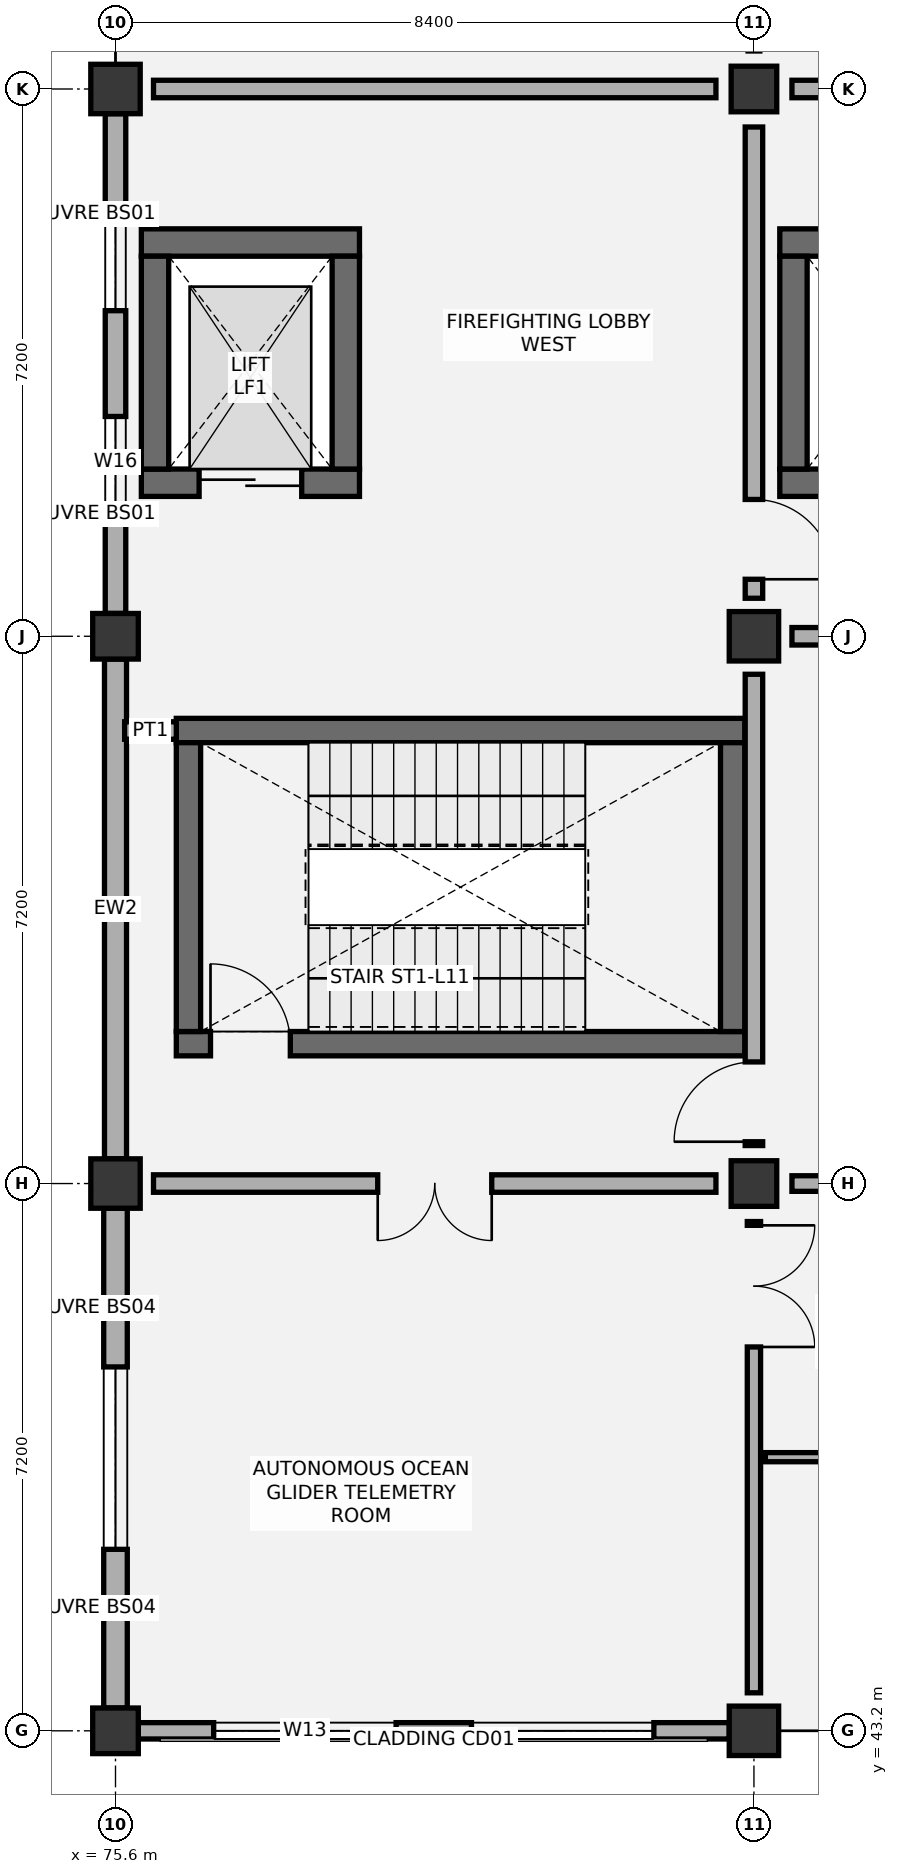
"""IFC4 building model, lengths in metres.
Left out: names, types, materials, properties, quantities, classifications, styles, units other than length and angle.
Written with IfcOpenShell. Run it as: python <this file> out.ifc"""

import sys

from ifc_helpers import new_model, si_unit, direction, frame, frame_2d, origin, origin_2d, place, context, subcontext, project, spatial, rectangle, extrude, element, fill, save


model = new_model("IFC4")
c1 = context("Model", 3, precision=1e-05, world=origin(), true_north=direction((0.0, 1.0)))
c2 = subcontext(c1, "Body", "Model", "MODEL_VIEW")
j1 = project(units=[si_unit("LENGTHUNIT", "METRE"), si_unit("PLANEANGLEUNIT", "RADIAN")], contexts=[c1])
p1 = place(None, origin())
s1 = spatial("IfcSite", under=j1, at=p1, CompositionType="ELEMENT")
p2 = place(p1, origin())
s2 = spatial("IfcBuilding", under=s1, at=p2, CompositionType="ELEMENT")
p3 = place(p2, frame((0.0, 0.0, 52.2)))
s3 = spatial("IfcBuildingStorey", under=s2, at=p3, CompositionType="ELEMENT", Elevation=52.2)
p4 = place(p3, frame((75.6, 43.2, 0.0), z_axis=(0.0, 0.0, 1.0), x_axis=(1.0, 0.0, 0.0)))
e1 = element("IfcColumn", 1, at=p4, inside=s3, PredefinedType="COLUMN", context=c2, shape_type="SweptSolid", body=[
    extrude(rectangle(XDim=0.6, YDim=0.6, at=origin_2d()), origin(), (0.0, 0.0, 1.0), 4.2),
])
p5 = place(p3, frame((75.6, 50.4, 0.0), z_axis=(0.0, 0.0, 1.0), x_axis=(1.0, 0.0, 0.0)))
e2 = element("IfcColumn", 2, at=p5, inside=s3, PredefinedType="COLUMN", context=c2, shape_type="SweptSolid", body=[
    extrude(rectangle(XDim=0.65, YDim=0.65, at=origin_2d()), origin(), (0.0, 0.0, 1.0), 4.2),
])
p6 = place(p3, frame((75.6, 57.6, 0.0), z_axis=(0.0, 0.0, 1.0), x_axis=(1.0, 0.0, 0.0)))
e3 = element("IfcColumn", 3, at=p6, inside=s3, PredefinedType="COLUMN", context=c2, shape_type="SweptSolid", body=[
    extrude(rectangle(XDim=0.6, YDim=0.6, at=origin_2d()), origin(), (0.0, 0.0, 1.0), 4.2),
])
for number, where, z_axis, x_axis in (
    (4, (75.6, 64.8, 0.0), (0.0, 0.0, 1.0), (1.0, 0.0, 0.0)),
    (5, (84.0, 43.2, 0.0), (0.0, 0.0, 1.0), (1.0, 0.0, 0.0)),
):
    element("IfcColumn", number, at=place(p3, frame(where, z_axis=z_axis, x_axis=x_axis)), inside=s3, PredefinedType="COLUMN", context=c2, shape_type="SweptSolid", body=[
        extrude(rectangle(XDim=0.65, YDim=0.65, at=origin_2d()), origin(), (0.0, 0.0, 1.0), 4.2),
    ])
p7 = place(p3, frame((84.0, 50.4, 0.0), z_axis=(0.0, 0.0, 1.0), x_axis=(1.0, 0.0, 0.0)))
e6 = element("IfcColumn", 6, at=p7, inside=s3, PredefinedType="COLUMN", context=c2, shape_type="SweptSolid", body=[
    extrude(rectangle(XDim=0.6, YDim=0.6, at=origin_2d()), origin(), (0.0, 0.0, 1.0), 4.2),
])
p8 = place(p3, frame((84.0, 57.6, 0.0), z_axis=(0.0, 0.0, 1.0), x_axis=(1.0, 0.0, 0.0)))
e7 = element("IfcColumn", 7, at=p8, inside=s3, PredefinedType="COLUMN", context=c2, shape_type="SweptSolid", body=[
    extrude(rectangle(XDim=0.65, YDim=0.65, at=origin_2d()), origin(), (0.0, 0.0, 1.0), 4.2),
])
p9 = place(p3, frame((84.0, 64.8, 0.0), z_axis=(0.0, 0.0, 1.0), x_axis=(1.0, 0.0, 0.0)))
e8 = element("IfcColumn", 8, at=p9, inside=s3, PredefinedType="COLUMN", context=c2, shape_type="SweptSolid", body=[
    extrude(rectangle(XDim=0.6, YDim=0.6, at=origin_2d()), origin(), (0.0, 0.0, 1.0), 4.2),
])
p10 = place(p3, frame((76.4, 52.24, 0.0), z_axis=(0.0, 0.0, 1.0), x_axis=(1.0, 0.0, 0.0)))
e9 = element("IfcWall", 9, at=p10, inside=s3, PredefinedType="SHEAR", context=c2, shape_type="SweptSolid", body=[
    extrude(rectangle(XDim=7.48, YDim=0.32, at=frame_2d((3.74, 0.0))), origin(), (0.0, 0.0, 1.0), 3.92),
])
p11 = place(p10, frame((0.45, 0.0, 0.0)))
e10 = element("IfcOpeningElement", 10, at=p11, cuts=e9, PredefinedType="OPENING", context=c2, shape_type="SweptSolid", body=[
    extrude(rectangle(XDim=1.05, YDim=2.15, at=frame_2d((0.525, 1.075))), frame((0.0, 0.17, 0.0), z_axis=(0.0, -1.0, 0.0), x_axis=(1.0, 0.0, 0.0)), (0.0, 0.0, 1.0), 0.34),
])
p12 = place(p3, frame((76.4, 56.36, 0.0), z_axis=(0.0, 0.0, 1.0), x_axis=(1.0, 0.0, 0.0)))
e11 = element("IfcWall", 11, at=p12, inside=s3, PredefinedType="SHEAR", context=c2, shape_type="SweptSolid", body=[
    extrude(rectangle(XDim=7.48, YDim=0.32, at=frame_2d((3.74, 0.0))), origin(), (0.0, 0.0, 1.0), 3.92),
])
for number, where, z_axis, x_axis in (
    (12, (76.56, 52.4, 0.0), (0.0, 0.0, 1.0), (0.0, 1.0, 0.0)),
    (13, (83.72, 52.4, 0.0), (0.0, 0.0, 1.0), (0.0, 1.0, 0.0)),
):
    element("IfcWall", number, at=place(p3, frame(where, z_axis=z_axis, x_axis=x_axis)), inside=s3, PredefinedType="SHEAR", context=c2, shape_type="SweptSolid", body=[
        extrude(rectangle(XDim=3.8, YDim=0.32, at=frame_2d((1.9, 0.0))), origin(), (0.0, 0.0, 1.0), 3.92),
    ])
p13 = place(p3, frame((75.94, 62.78, 0.0), z_axis=(0.0, 0.0, 1.0), x_axis=(1.0, 0.0, 0.0)))
e14 = element("IfcWall", 14, at=p13, inside=s3, PredefinedType="SHEAR", context=c2, shape_type="SweptSolid", body=[
    extrude(rectangle(XDim=2.87, YDim=0.36, at=frame_2d((1.435, 0.0))), origin(), (0.0, 0.0, 1.0), 3.92),
])
p14 = place(p3, frame((75.94, 59.62, 0.0), z_axis=(0.0, 0.0, 1.0), x_axis=(1.0, 0.0, 0.0)))
e15 = element("IfcWall", 15, at=p14, inside=s3, PredefinedType="SHEAR", context=c2, shape_type="SweptSolid", body=[
    extrude(rectangle(XDim=2.87, YDim=0.36, at=frame_2d((1.435, 0.0))), origin(), (0.0, 0.0, 1.0), 3.92),
])
p15 = place(p14, frame((0.76, 0.0, 0.0)))
e16 = element("IfcOpeningElement", 16, at=p15, cuts=e15, PredefinedType="OPENING", context=c2, shape_type="SweptSolid", body=[
    extrude(rectangle(XDim=1.35, YDim=2.2, at=frame_2d((0.675, 1.1))), frame((0.0, 0.19, 0.0), z_axis=(0.0, -1.0, 0.0), x_axis=(1.0, 0.0, 0.0)), (0.0, 0.0, 1.0), 0.38),
])
for number, where, z_axis, x_axis in (
    (17, (76.12, 59.8, 0.0), (0.0, 0.0, 1.0), (0.0, 1.0, 0.0)),
    (18, (78.63, 59.8, 0.0), (0.0, 0.0, 1.0), (0.0, 1.0, 0.0)),
):
    element("IfcWall", number, at=place(p3, frame(where, z_axis=z_axis, x_axis=x_axis)), inside=s3, PredefinedType="SHEAR", context=c2, shape_type="SweptSolid", body=[
        extrude(rectangle(XDim=2.8, YDim=0.36, at=frame_2d((1.4, 0.0))), origin(), (0.0, 0.0, 1.0), 3.92),
    ])
p16 = place(p3, frame((84.34, 62.78, 0.0), z_axis=(0.0, 0.0, 1.0), x_axis=(1.0, 0.0, 0.0)))
e19 = element("IfcWall", 19, at=p16, inside=s3, PredefinedType="SHEAR", context=c2, shape_type="SweptSolid", body=[
    extrude(rectangle(XDim=7.77, YDim=0.36, at=frame_2d((3.885, 0.0))), origin(), (0.0, 0.0, 1.0), 3.92),
])
p17 = place(p3, frame((84.34, 59.62, 0.0), z_axis=(0.0, 0.0, 1.0), x_axis=(1.0, 0.0, 0.0)))
e20 = element("IfcWall", 20, at=p17, inside=s3, PredefinedType="SHEAR", context=c2, shape_type="SweptSolid", body=[
    extrude(rectangle(XDim=2.66, YDim=0.36, at=frame_2d((1.33, 0.0))), origin(), (0.0, 0.0, 1.0), 3.92),
])
p18 = place(p17, frame((0.78, 0.0, 0.0)))
e21 = element("IfcOpeningElement", 21, at=p18, cuts=e20, PredefinedType="OPENING", context=c2, shape_type="SweptSolid", body=[
    extrude(rectangle(XDim=1.1, YDim=2.15, at=frame_2d((0.55, 1.075))), frame((0.0, 0.19, 0.0), z_axis=(0.0, -1.0, 0.0), x_axis=(1.0, 0.0, 0.0)), (0.0, 0.0, 1.0), 0.38),
])
p19 = place(p3, frame((84.52, 59.8, 0.0), z_axis=(0.0, 0.0, 1.0), x_axis=(0.0, 1.0, 0.0)))
e22 = element("IfcWall", 22, at=p19, inside=s3, PredefinedType="SHEAR", context=c2, shape_type="SweptSolid", body=[
    extrude(rectangle(XDim=2.8, YDim=0.36, at=frame_2d((1.4, 0.0))), origin(), (0.0, 0.0, 1.0), 3.92),
])
p20 = place(p3, frame((75.9, 43.2, 0.0), z_axis=(0.0, 0.0, 1.0), x_axis=(1.0, 0.0, 0.0)))
e23 = element("IfcWall", 23, at=p20, inside=s3, PredefinedType="SOLIDWALL", context=c2, shape_type="SweptSolid", body=[
    extrude(rectangle(XDim=7.775, YDim=0.215, at=frame_2d((3.888, 0.0))), origin(), (0.0, 0.0, 1.0), 3.365),
])
p21 = place(p20, frame((0.992, 0.0, 0.95)))
e24 = element("IfcOpeningElement", 24, at=p21, cuts=e23, PredefinedType="OPENING", context=c2, shape_type="SweptSolid", body=[
    extrude(rectangle(XDim=2.4, YDim=1.5, at=frame_2d((1.2, 0.75))), frame((0.0, 0.117, 0.0), z_axis=(0.0, -1.0, 0.0), x_axis=(1.0, 0.0, 0.0)), (0.0, 0.0, 1.0), 0.235),
])
p22 = place(p20, frame((4.383, 0.0, 0.95)))
e25 = element("IfcOpeningElement", 25, at=p22, cuts=e23, PredefinedType="OPENING", context=c2, shape_type="SweptSolid", body=[
    extrude(rectangle(XDim=2.4, YDim=1.5, at=frame_2d((1.2, 0.75))), frame((0.0, 0.117, 0.0), z_axis=(0.0, -1.0, 0.0), x_axis=(1.0, 0.0, 0.0)), (0.0, 0.0, 1.0), 0.235),
])
p23 = place(p3, frame((75.6, 43.5, 0.0), z_axis=(0.0, 0.0, 1.0), x_axis=(0.0, 1.0, 0.0)))
e26 = element("IfcWall", 26, at=p23, inside=s3, PredefinedType="SOLIDWALL", context=c2, shape_type="SweptSolid", body=[
    extrude(rectangle(XDim=6.575, YDim=0.31, at=frame_2d((3.288, 0.0))), origin(), (0.0, 0.0, 1.0), 3.365),
])
p24 = place(p23, frame((2.087, 0.0, 0.95)))
e27 = element("IfcOpeningElement", 27, at=p24, cuts=e26, PredefinedType="OPENING", context=c2, shape_type="SweptSolid", body=[
    extrude(rectangle(XDim=2.4, YDim=1.5, at=frame_2d((1.2, 0.75))), frame((0.0, 0.165, 0.0), z_axis=(0.0, -1.0, 0.0), x_axis=(1.0, 0.0, 0.0)), (0.0, 0.0, 1.0), 0.33),
])
p25 = place(p3, frame((75.6, 50.725, 0.0), z_axis=(0.0, 0.0, 1.0), x_axis=(0.0, 1.0, 0.0)))
e28 = element("IfcWall", 28, at=p25, inside=s3, PredefinedType="SOLIDWALL", context=c2, shape_type="SweptSolid", body=[
    extrude(rectangle(XDim=6.575, YDim=0.29, at=frame_2d((3.288, 0.0))), origin(), (0.0, 0.0, 1.0), 3.365),
])
p26 = place(p3, frame((75.6, 57.9, 0.0), z_axis=(0.0, 0.0, 1.0), x_axis=(0.0, 1.0, 0.0)))
e29 = element("IfcWall", 29, at=p26, inside=s3, PredefinedType="SOLIDWALL", context=c2, shape_type="SweptSolid", body=[
    extrude(rectangle(XDim=6.575, YDim=0.27, at=frame_2d((3.288, 0.0))), origin(), (0.0, 0.0, 1.0), 3.365),
])
p27 = place(p26, frame((1.392, 0.0, 0.95)))
e30 = element("IfcOpeningElement", 30, at=p27, cuts=e29, PredefinedType="OPENING", context=c2, shape_type="SweptSolid", body=[
    extrude(rectangle(XDim=1.2, YDim=1.5, at=frame_2d((0.6, 0.75))), frame((0.0, 0.145, 0.0), z_axis=(0.0, -1.0, 0.0), x_axis=(1.0, 0.0, 0.0)), (0.0, 0.0, 1.0), 0.29),
])
p28 = place(p26, frame((3.983, 0.0, 0.95)))
e31 = element("IfcOpeningElement", 31, at=p28, cuts=e29, PredefinedType="OPENING", context=c2, shape_type="SweptSolid", body=[
    extrude(rectangle(XDim=1.2, YDim=1.5, at=frame_2d((0.6, 0.75))), frame((0.0, 0.145, 0.0), z_axis=(0.0, -1.0, 0.0), x_axis=(1.0, 0.0, 0.0)), (0.0, 0.0, 1.0), 0.29),
])
p29 = place(p3, frame((84.15, 46.8, 0.0), z_axis=(0.0, 0.0, 1.0), x_axis=(1.0, 0.0, 0.0)))
e32 = element("IfcWall", 32, at=p29, inside=s3, PredefinedType="PARTITIONING", context=c2, shape_type="SweptSolid", body=[
    extrude(rectangle(XDim=8.1, YDim=0.12, at=frame_2d((4.05, 0.0))), origin(), (0.0, 0.0, 1.0), 3.92),
])
p30 = place(p29, frame((3.55, 0.0, 0.0)))
e33 = element("IfcOpeningElement", 33, at=p30, cuts=e32, PredefinedType="OPENING", context=c2, shape_type="SweptSolid", body=[
    extrude(rectangle(XDim=1.6, YDim=2.2, at=frame_2d((0.8, 1.1))), frame((0.0, 0.07, 0.0), z_axis=(0.0, -1.0, 0.0), x_axis=(1.0, 0.0, 0.0)), (0.0, 0.0, 1.0), 0.14),
])
p31 = place(p3, frame((84.0, 43.7, 0.0), z_axis=(0.0, 0.0, 1.0), x_axis=(0.0, 1.0, 0.0)))
e34 = element("IfcWall", 34, at=p31, inside=s3, PredefinedType="PARTITIONING", context=c2, shape_type="SweptSolid", body=[
    extrude(rectangle(XDim=6.2, YDim=0.175, at=frame_2d((3.1, 0.0))), origin(), (0.0, 0.0, 1.0), 3.415),
])
p32 = place(p31, frame((4.55, 0.0, 0.0)))
e35 = element("IfcOpeningElement", 35, at=p32, cuts=e34, PredefinedType="OPENING", context=c2, shape_type="SweptSolid", body=[
    extrude(rectangle(XDim=1.6, YDim=2.2, at=frame_2d((0.8, 1.1))), frame((0.0, 0.097, 0.0), z_axis=(0.0, -1.0, 0.0), x_axis=(1.0, 0.0, 0.0)), (0.0, 0.0, 1.0), 0.195),
])
p33 = place(p3, frame((76.1, 50.4, 0.0), z_axis=(0.0, 0.0, 1.0), x_axis=(1.0, 0.0, 0.0)))
e36 = element("IfcWall", 36, at=p33, inside=s3, PredefinedType="PARTITIONING", context=c2, shape_type="SweptSolid", body=[
    extrude(rectangle(XDim=7.4, YDim=0.23, at=frame_2d((3.7, 0.0))), origin(), (0.0, 0.0, 1.0), 3.415),
])
p34 = place(p33, frame((2.95, 0.0, 0.0)))
e37 = element("IfcOpeningElement", 37, at=p34, cuts=e36, PredefinedType="OPENING", context=c2, shape_type="SweptSolid", body=[
    extrude(rectangle(XDim=1.5, YDim=2.15, at=frame_2d((0.75, 1.075))), frame((0.0, 0.125, 0.0), z_axis=(0.0, -1.0, 0.0), x_axis=(1.0, 0.0, 0.0)), (0.0, 0.0, 1.0), 0.25),
])
p35 = place(p3, frame((84.0, 50.9, 0.0), z_axis=(0.0, 0.0, 1.0), x_axis=(0.0, 1.0, 0.0)))
e38 = element("IfcWall", 38, at=p35, inside=s3, PredefinedType="PARTITIONING", context=c2, shape_type="SweptSolid", body=[
    extrude(rectangle(XDim=6.2, YDim=0.23, at=frame_2d((3.1, 0.0))), origin(), (0.0, 0.0, 1.0), 3.415),
])
p36 = place(p35, frame((0.05, 0.0, 0.0)))
e39 = element("IfcOpeningElement", 39, at=p36, cuts=e38, PredefinedType="OPENING", context=c2, shape_type="SweptSolid", body=[
    extrude(rectangle(XDim=1.05, YDim=2.15, at=frame_2d((0.525, 1.075))), frame((0.0, 0.125, 0.0), z_axis=(0.0, -1.0, 0.0), x_axis=(1.0, 0.0, 0.0)), (0.0, 0.0, 1.0), 0.25),
])
p37 = place(p3, frame((75.72, 56.36, 0.0), z_axis=(0.0, 0.0, 1.0), x_axis=(1.0, 0.0, 0.0)))
e40 = element("IfcWall", 40, at=p37, inside=s3, PredefinedType="PARTITIONING", context=c2, shape_type="SweptSolid", body=[
    extrude(rectangle(XDim=0.68, YDim=0.23, at=frame_2d((0.34, 0.0))), origin(), (0.0, 0.0, 1.0), 3.92),
])
p38 = place(p3, frame((84.0, 58.1, 0.0), z_axis=(0.0, 0.0, 1.0), x_axis=(0.0, 1.0, 0.0)))
e41 = element("IfcWall", 41, at=p38, inside=s3, PredefinedType="PARTITIONING", context=c2, shape_type="SweptSolid", body=[
    extrude(rectangle(XDim=6.2, YDim=0.23, at=frame_2d((3.1, 0.0))), origin(), (0.0, 0.0, 1.0), 3.415),
])
p39 = place(p38, frame((0.25, 0.0, 0.0)))
e42 = element("IfcOpeningElement", 42, at=p39, cuts=e41, PredefinedType="OPENING", context=c2, shape_type="SweptSolid", body=[
    extrude(rectangle(XDim=1.05, YDim=2.15, at=frame_2d((0.525, 1.075))), frame((0.0, 0.125, 0.0), z_axis=(0.0, -1.0, 0.0), x_axis=(1.0, 0.0, 0.0)), (0.0, 0.0, 1.0), 0.25),
])
p40 = place(p3, frame((76.1, 64.8, 0.0), z_axis=(0.0, 0.0, 1.0), x_axis=(1.0, 0.0, 0.0)))
e43 = element("IfcWall", 43, at=p40, inside=s3, PredefinedType="PARTITIONING", context=c2, shape_type="SweptSolid", body=[
    extrude(rectangle(XDim=7.4, YDim=0.23, at=frame_2d((3.7, 0.0))), origin(), (0.0, 0.0, 1.0), 3.415),
])
p41 = place(p3, frame((84.5, 50.4, 0.0), z_axis=(0.0, 0.0, 1.0), x_axis=(1.0, 0.0, 0.0)))
e44 = element("IfcWall", 44, at=p41, inside=s3, PredefinedType="PARTITIONING", context=c2, shape_type="SweptSolid", body=[
    extrude(rectangle(XDim=7.4, YDim=0.205, at=frame_2d((3.7, 0.0))), origin(), (0.0, 0.0, 1.0), 3.465),
])
p42 = place(p41, frame((3.075, 0.0, 0.0)))
e45 = element("IfcOpeningElement", 45, at=p42, cuts=e44, PredefinedType="OPENING", context=c2, shape_type="SweptSolid", body=[
    extrude(rectangle(XDim=1.25, YDim=2.1, at=frame_2d((0.625, 1.05))), frame((0.0, 0.113, 0.0), z_axis=(0.0, -1.0, 0.0), x_axis=(1.0, 0.0, 0.0)), (0.0, 0.0, 1.0), 0.225),
])
p43 = place(p3, frame((84.5, 57.6, 0.0), z_axis=(0.0, 0.0, 1.0), x_axis=(1.0, 0.0, 0.0)))
e46 = element("IfcWall", 46, at=p43, inside=s3, PredefinedType="PARTITIONING", context=c2, shape_type="SweptSolid", body=[
    extrude(rectangle(XDim=7.4, YDim=0.23, at=frame_2d((3.7, 0.0))), origin(), (0.0, 0.0, 1.0), 3.465),
])
p44 = place(p43, frame((2.95, 0.0, 0.0)))
e47 = element("IfcOpeningElement", 47, at=p44, cuts=e46, PredefinedType="OPENING", context=c2, shape_type="SweptSolid", body=[
    extrude(rectangle(XDim=1.5, YDim=2.15, at=frame_2d((0.75, 1.075))), frame((0.0, 0.125, 0.0), z_axis=(0.0, -1.0, 0.0), x_axis=(1.0, 0.0, 0.0)), (0.0, 0.0, 1.0), 0.25),
])
p45 = place(p3, frame((84.5, 64.8, 0.0), z_axis=(0.0, 0.0, 1.0), x_axis=(1.0, 0.0, 0.0)))
e48 = element("IfcWall", 48, at=p45, inside=s3, PredefinedType="PARTITIONING", context=c2, shape_type="SweptSolid", body=[
    extrude(rectangle(XDim=7.4, YDim=0.23, at=frame_2d((3.7, 0.0))), origin(), (0.0, 0.0, 1.0), 3.465),
])
p46 = place(p21, origin())
e49 = element("IfcWindow", 49, at=p46, inside=s3, PartitioningType="SINGLE_PANEL", PredefinedType="WINDOW", context=c2, shape_type="SweptSolid", body=[
    extrude(rectangle(XDim=2.4, YDim=1.5, at=frame_2d((1.2, 0.75))), frame((0.0, 0.03, 0.0), z_axis=(0.0, -1.0, 0.0), x_axis=(1.0, 0.0, 0.0)), (0.0, 0.0, 1.0), 0.06),
])
fill(e24, e49)
p47 = place(p22, origin())
e50 = element("IfcWindow", 50, at=p47, inside=s3, PartitioningType="SINGLE_PANEL", PredefinedType="WINDOW", context=c2, shape_type="SweptSolid", body=[
    extrude(rectangle(XDim=2.4, YDim=1.5, at=frame_2d((1.2, 0.75))), frame((0.0, 0.03, 0.0), z_axis=(0.0, -1.0, 0.0), x_axis=(1.0, 0.0, 0.0)), (0.0, 0.0, 1.0), 0.06),
])
fill(e25, e50)
p48 = place(p24, origin())
e51 = element("IfcWindow", 51, at=p48, inside=s3, PartitioningType="SINGLE_PANEL", PredefinedType="WINDOW", context=c2, shape_type="SweptSolid", body=[
    extrude(rectangle(XDim=2.4, YDim=1.5, at=frame_2d((1.2, 0.75))), frame((0.0, 0.03, 0.0), z_axis=(0.0, -1.0, 0.0), x_axis=(1.0, 0.0, 0.0)), (0.0, 0.0, 1.0), 0.06),
])
fill(e27, e51)
p49 = place(p27, origin())
e52 = element("IfcWindow", 52, at=p49, inside=s3, PartitioningType="SINGLE_PANEL", PredefinedType="WINDOW", context=c2, shape_type="SweptSolid", body=[
    extrude(rectangle(XDim=1.2, YDim=1.5, at=frame_2d((0.6, 0.75))), frame((0.0, 0.03, 0.0), z_axis=(0.0, -1.0, 0.0), x_axis=(1.0, 0.0, 0.0)), (0.0, 0.0, 1.0), 0.06),
])
fill(e30, e52)
p50 = place(p28, origin())
e53 = element("IfcWindow", 53, at=p50, inside=s3, PartitioningType="SINGLE_PANEL", PredefinedType="WINDOW", context=c2, shape_type="SweptSolid", body=[
    extrude(rectangle(XDim=1.2, YDim=1.5, at=frame_2d((0.6, 0.75))), frame((0.0, 0.03, 0.0), z_axis=(0.0, -1.0, 0.0), x_axis=(1.0, 0.0, 0.0)), (0.0, 0.0, 1.0), 0.06),
])
fill(e31, e53)
p51 = place(p11, origin())
e54 = element("IfcDoor", 54, at=p51, inside=s3, OperationType="SINGLE_SWING_LEFT", PredefinedType="DOOR", context=c2, shape_type="SweptSolid", body=[
    extrude(rectangle(XDim=1.05, YDim=2.15, at=frame_2d((0.525, 1.075))), frame((0.0, 0.025, 0.0), z_axis=(0.0, -1.0, 0.0), x_axis=(1.0, 0.0, 0.0)), (0.0, 0.0, 1.0), 0.05),
])
fill(e10, e54)
p52 = place(p15, origin())
e55 = element("IfcDoor", 55, at=p52, inside=s3, OperationType="DOUBLE_DOOR_SLIDING", PredefinedType="DOOR", context=c2, shape_type="SweptSolid", body=[
    extrude(rectangle(XDim=1.35, YDim=2.2, at=frame_2d((0.675, 1.1))), frame((0.0, 0.025, 0.0), z_axis=(0.0, -1.0, 0.0), x_axis=(1.0, 0.0, 0.0)), (0.0, 0.0, 1.0), 0.05),
])
fill(e16, e55)
p53 = place(p32, frame((1.6, 0.0, 0.0), z_axis=(0.0, 0.0, 1.0), x_axis=(-1.0, 0.0, 0.0)))
e56 = element("IfcDoor", 56, at=p53, inside=s3, OperationType="DOUBLE_DOOR_SINGLE_SWING", PredefinedType="DOOR", context=c2, shape_type="SweptSolid", body=[
    extrude(rectangle(XDim=1.6, YDim=2.2, at=frame_2d((0.8, 1.1))), frame((0.0, 0.025, 0.0), z_axis=(0.0, -1.0, 0.0), x_axis=(1.0, 0.0, 0.0)), (0.0, 0.0, 1.0), 0.05),
])
fill(e35, e56)
p54 = place(p34, frame((1.5, 0.0, 0.0), z_axis=(0.0, 0.0, 1.0), x_axis=(-1.0, 0.0, 0.0)))
e57 = element("IfcDoor", 57, at=p54, inside=s3, OperationType="DOUBLE_DOOR_SINGLE_SWING", PredefinedType="DOOR", context=c2, shape_type="SweptSolid", body=[
    extrude(rectangle(XDim=1.5, YDim=2.15, at=frame_2d((0.75, 1.075))), frame((0.0, 0.025, 0.0), z_axis=(0.0, -1.0, 0.0), x_axis=(1.0, 0.0, 0.0)), (0.0, 0.0, 1.0), 0.05),
])
fill(e37, e57)
p55 = place(p36, origin())
e58 = element("IfcDoor", 58, at=p55, inside=s3, OperationType="SINGLE_SWING_LEFT", PredefinedType="DOOR", context=c2, shape_type="SweptSolid", body=[
    extrude(rectangle(XDim=1.05, YDim=2.15, at=frame_2d((0.525, 1.075))), frame((0.0, 0.025, 0.0), z_axis=(0.0, -1.0, 0.0), x_axis=(1.0, 0.0, 0.0)), (0.0, 0.0, 1.0), 0.05),
])
fill(e39, e58)
p56 = place(p39, frame((1.05, 0.0, 0.0), z_axis=(0.0, 0.0, 1.0), x_axis=(-1.0, 0.0, 0.0)))
e59 = element("IfcDoor", 59, at=p56, inside=s3, OperationType="SINGLE_SWING_RIGHT", PredefinedType="DOOR", context=c2, shape_type="SweptSolid", body=[
    extrude(rectangle(XDim=1.05, YDim=2.15, at=frame_2d((0.525, 1.075))), frame((0.0, 0.025, 0.0), z_axis=(0.0, -1.0, 0.0), x_axis=(1.0, 0.0, 0.0)), (0.0, 0.0, 1.0), 0.05),
])
fill(e42, e59)
save(model, sys.argv[1])
